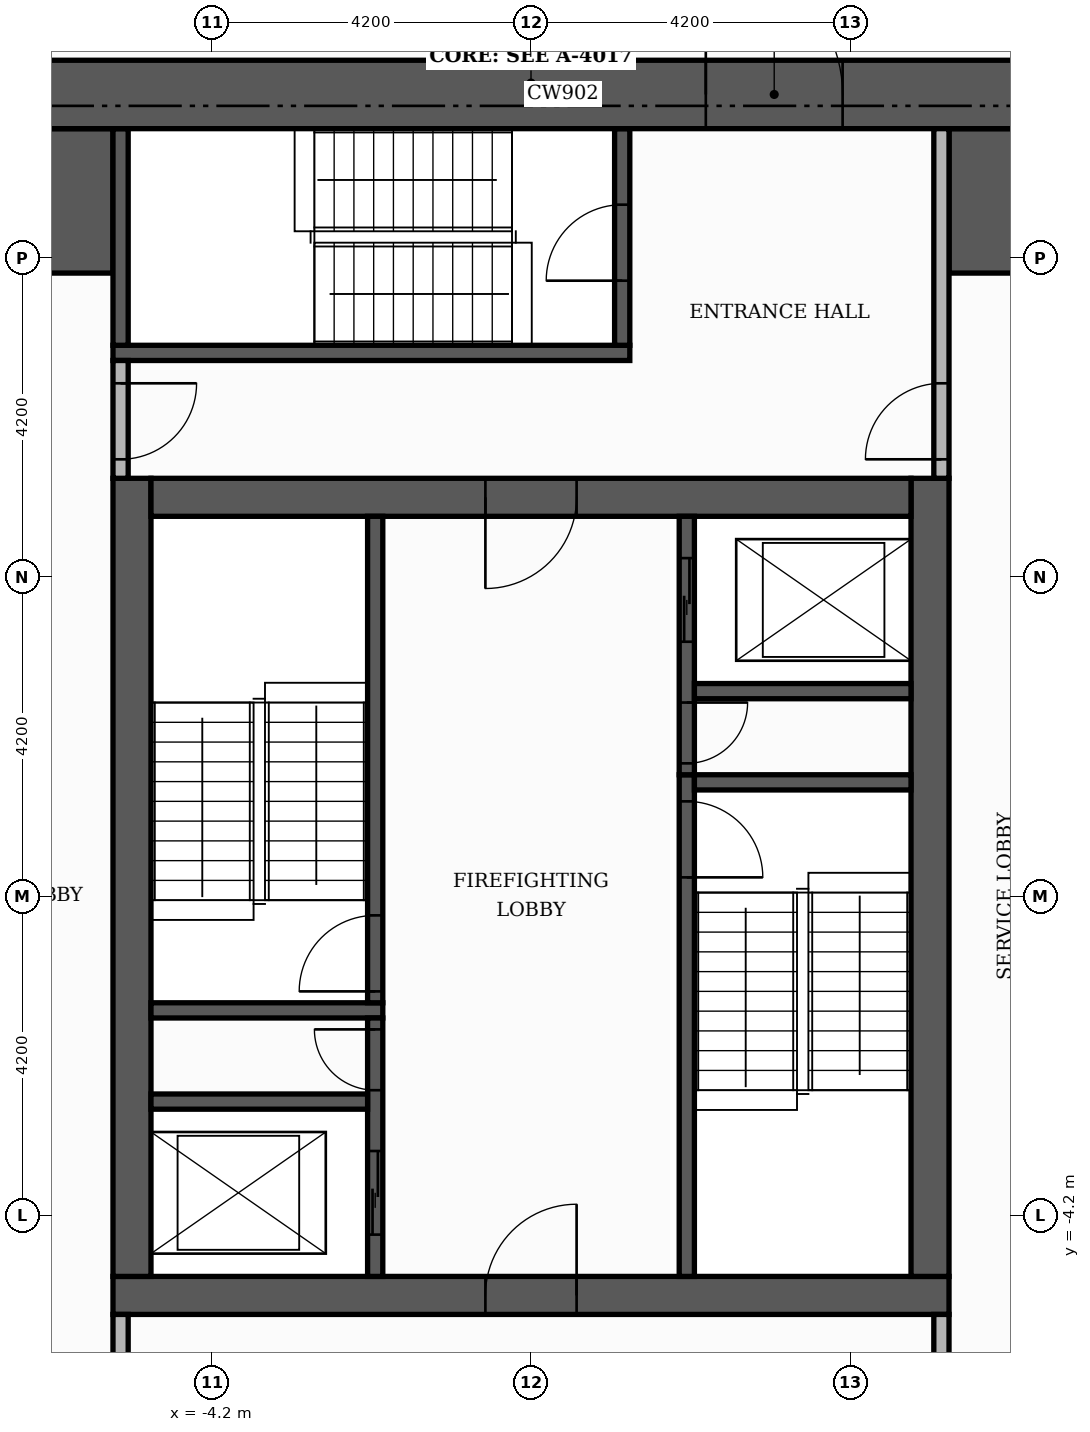
"""IFC4 building model, lengths in metres.
Left out: names, types, materials, properties, quantities, classifications, styles, units other than length and angle.
Written with IfcOpenShell. Run it as: python <this file> out.ifc"""

import sys

from ifc_helpers import new_model, si_unit, direction, frame, frame_2d, origin, place, context, subcontext, project, spatial, rectangle, extrude, element, fill, save


model = new_model("IFC4")
c1 = context("Model", 3, precision=1e-05, world=origin(), true_north=direction((0.0, 1.0)))
c2 = subcontext(c1, "Body", "Model", "MODEL_VIEW")
j1 = project(units=[si_unit("LENGTHUNIT", "METRE"), si_unit("PLANEANGLEUNIT", "RADIAN")], contexts=[c1])
p1 = place(None, origin())
s1 = spatial("IfcSite", under=j1, at=p1, CompositionType="ELEMENT")
p2 = place(p1, origin())
s2 = spatial("IfcBuilding", under=s1, at=p2, CompositionType="ELEMENT")
p3 = place(p2, frame((0.0, 0.0, 114.3)))
s3 = spatial("IfcBuildingStorey", under=s2, at=p3, CompositionType="ELEMENT", Elevation=114.3)
p4 = place(p3, frame((-5.5, -5.25, 0.0), z_axis=(0.0, 0.0, 1.0), x_axis=(1.0, 0.0, 0.0)))
e1 = element("IfcWall", 1, at=p4, inside=s3, PredefinedType="SHEAR", context=c2, shape_type="SweptSolid", body=[
    extrude(rectangle(XDim=11.0, YDim=0.5, at=frame_2d((5.5, 0.0))), origin(), (0.0, 0.0, 1.0), 3.48),
])
p5 = place(p4, frame((4.9, 0.0, 0.0)))
e2 = element("IfcOpeningElement", 2, at=p5, cuts=e1, PredefinedType="OPENING", context=c2, shape_type="SweptSolid", body=[
    extrude(rectangle(XDim=1.2, YDim=2.1, at=frame_2d((0.6, 1.05))), frame((0.0, 0.26, 0.0), z_axis=(0.0, -1.0, 0.0), x_axis=(1.0, 0.0, 0.0)), (0.0, 0.0, 1.0), 0.52),
])
for number, where, z_axis, x_axis in (
    (3, (-5.25, -5.0, 0.0), (0.0, 0.0, 1.0), (0.0, 1.0, 0.0)),
    (4, (5.25, -5.0, 0.0), (0.0, 0.0, 1.0), (0.0, 1.0, 0.0)),
):
    element("IfcWall", number, at=place(p3, frame(where, z_axis=z_axis, x_axis=x_axis)), inside=s3, PredefinedType="SHEAR", context=c2, shape_type="SweptSolid", body=[
        extrude(rectangle(XDim=10.5, YDim=0.5, at=frame_2d((5.25, 0.0))), origin(), (0.0, 0.0, 1.0), 3.48),
    ])
p6 = place(p3, frame((-5.0, 5.25, 0.0), z_axis=(0.0, 0.0, 1.0), x_axis=(1.0, 0.0, 0.0)))
e5 = element("IfcWall", 5, at=p6, inside=s3, PredefinedType="SHEAR", context=c2, shape_type="SweptSolid", body=[
    extrude(rectangle(XDim=10.0, YDim=0.5, at=frame_2d((5.0, 0.0))), origin(), (0.0, 0.0, 1.0), 3.48),
])
p7 = place(p6, frame((4.4, 0.0, 0.0)))
e6 = element("IfcOpeningElement", 6, at=p7, cuts=e5, PredefinedType="OPENING", context=c2, shape_type="SweptSolid", body=[
    extrude(rectangle(XDim=1.2, YDim=2.1, at=frame_2d((0.6, 1.05))), frame((0.0, 0.26, 0.0), z_axis=(0.0, -1.0, 0.0), x_axis=(1.0, 0.0, 0.0)), (0.0, 0.0, 1.0), 0.52),
])
for number, where, z_axis, x_axis in (
    (7, (-10.1, 9.15, 0.0), (0.0, 0.0, 1.0), (1.0, 0.0, 0.0)),
    (8, (5.5, 9.15, 0.0), (0.0, 0.0, 1.0), (1.0, 0.0, 0.0)),
):
    element("IfcWall", number, at=place(p3, frame(where, z_axis=z_axis, x_axis=x_axis)), inside=s3, PredefinedType="SHEAR", context=c2, shape_type="SweptSolid", body=[
        extrude(rectangle(XDim=4.6, YDim=1.9, at=frame_2d((2.3, 0.0))), origin(), (0.0, 0.0, 1.0), 3.48),
    ])
p8 = place(p3, frame((2.05, -5.0, 0.0), z_axis=(0.0, 0.0, 1.0), x_axis=(0.0, 1.0, 0.0)))
e9 = element("IfcWall", 9, at=p8, inside=s3, PredefinedType="SHEAR", context=c2, shape_type="SweptSolid", body=[
    extrude(rectangle(XDim=6.6, YDim=0.2, at=frame_2d((3.3, 0.0))), origin(), (0.0, 0.0, 1.0), 3.48),
])
p9 = place(p8, frame((5.25, 0.0, 0.0)))
e10 = element("IfcOpeningElement", 10, at=p9, cuts=e9, PredefinedType="OPENING", context=c2, shape_type="SweptSolid", body=[
    extrude(rectangle(XDim=1.0, YDim=2.1, at=frame_2d((0.5, 1.05))), frame((0.0, 0.11, 0.0), z_axis=(0.0, -1.0, 0.0), x_axis=(1.0, 0.0, 0.0)), (0.0, 0.0, 1.0), 0.22),
])
p10 = place(p3, frame((-5.0, -1.5, 0.0), z_axis=(0.0, 0.0, 1.0), x_axis=(1.0, 0.0, 0.0)))
e11 = element("IfcWall", 11, at=p10, inside=s3, PredefinedType="SHEAR", context=c2, shape_type="SweptSolid", body=[
    extrude(rectangle(XDim=3.05, YDim=0.2, at=frame_2d((1.525, 0.0))), origin(), (0.0, 0.0, 1.0), 3.48),
])
p11 = place(p3, frame((-2.05, -1.4, 0.0), z_axis=(0.0, 0.0, 1.0), x_axis=(0.0, 1.0, 0.0)))
e12 = element("IfcWall", 12, at=p11, inside=s3, PredefinedType="SHEAR", context=c2, shape_type="SweptSolid", body=[
    extrude(rectangle(XDim=6.4, YDim=0.2, at=frame_2d((3.2, 0.0))), origin(), (0.0, 0.0, 1.0), 3.48),
])
p12 = place(p11, frame((0.15, 0.0, 0.0)))
e13 = element("IfcOpeningElement", 13, at=p12, cuts=e12, PredefinedType="OPENING", context=c2, shape_type="SweptSolid", body=[
    extrude(rectangle(XDim=1.0, YDim=2.1, at=frame_2d((0.5, 1.05))), frame((0.0, 0.11, 0.0), z_axis=(0.0, -1.0, 0.0), x_axis=(1.0, 0.0, 0.0)), (0.0, 0.0, 1.0), 0.22),
])
p13 = place(p3, frame((2.15, 1.5, 0.0), z_axis=(0.0, 0.0, 1.0), x_axis=(1.0, 0.0, 0.0)))
e14 = element("IfcWall", 14, at=p13, inside=s3, PredefinedType="SHEAR", context=c2, shape_type="SweptSolid", body=[
    extrude(rectangle(XDim=2.85, YDim=0.2, at=frame_2d((1.425, 0.0))), origin(), (0.0, 0.0, 1.0), 3.48),
])
p14 = place(p3, frame((-5.5, 7.15, 0.0), z_axis=(0.0, 0.0, 1.0), x_axis=(1.0, 0.0, 0.0)))
e15 = element("IfcWall", 15, at=p14, inside=s3, PredefinedType="SHEAR", context=c2, shape_type="SweptSolid", body=[
    extrude(rectangle(XDim=6.8, YDim=0.2, at=frame_2d((3.4, 0.0))), origin(), (0.0, 0.0, 1.0), 3.48),
])
p15 = place(p3, frame((-5.4, 7.25, 0.0), z_axis=(0.0, 0.0, 1.0), x_axis=(0.0, 1.0, 0.0)))
e16 = element("IfcWall", 16, at=p15, inside=s3, PredefinedType="SHEAR", context=c2, shape_type="SweptSolid", body=[
    extrude(rectangle(XDim=2.85, YDim=0.2, at=frame_2d((1.425, 0.0))), origin(), (0.0, 0.0, 1.0), 3.48),
])
p16 = place(p3, frame((1.2, 7.25, 0.0), z_axis=(0.0, 0.0, 1.0), x_axis=(0.0, 1.0, 0.0)))
e17 = element("IfcWall", 17, at=p16, inside=s3, PredefinedType="SHEAR", context=c2, shape_type="SweptSolid", body=[
    extrude(rectangle(XDim=2.85, YDim=0.2, at=frame_2d((1.425, 0.0))), origin(), (0.0, 0.0, 1.0), 3.48),
])
p17 = place(p16, frame((0.85, 0.0, 0.0)))
e18 = element("IfcOpeningElement", 18, at=p17, cuts=e17, PredefinedType="OPENING", context=c2, shape_type="SweptSolid", body=[
    extrude(rectangle(XDim=1.0, YDim=2.1, at=frame_2d((0.5, 1.05))), frame((0.0, 0.11, 0.0), z_axis=(0.0, -1.0, 0.0), x_axis=(1.0, 0.0, 0.0)), (0.0, 0.0, 1.0), 0.22),
])
p18 = place(p3, frame((-2.05, -5.0, 0.0), z_axis=(0.0, 0.0, 1.0), x_axis=(0.0, 1.0, 0.0)))
e19 = element("IfcWall", 19, at=p18, inside=s3, PredefinedType="SHEAR", context=c2, shape_type="SweptSolid", body=[
    extrude(rectangle(XDim=3.4, YDim=0.2, at=frame_2d((1.7, 0.0))), origin(), (0.0, 0.0, 1.0), 3.48),
])
p19 = place(p18, frame((0.55, 0.0, 0.0)))
e20 = element("IfcOpeningElement", 20, at=p19, cuts=e19, PredefinedType="OPENING", context=c2, shape_type="SweptSolid", body=[
    extrude(rectangle(XDim=1.1, YDim=2.1, at=frame_2d((0.55, 1.05))), frame((0.0, 0.11, 0.0), z_axis=(0.0, -1.0, 0.0), x_axis=(1.0, 0.0, 0.0)), (0.0, 0.0, 1.0), 0.22),
])
p20 = place(p18, frame((2.45, 0.0, 0.0)))
e21 = element("IfcOpeningElement", 21, at=p20, cuts=e19, PredefinedType="OPENING", context=c2, shape_type="SweptSolid", body=[
    extrude(rectangle(XDim=0.8, YDim=2.1, at=frame_2d((0.4, 1.05))), frame((0.0, 0.11, 0.0), z_axis=(0.0, -1.0, 0.0), x_axis=(1.0, 0.0, 0.0)), (0.0, 0.0, 1.0), 0.22),
])
p21 = place(p3, frame((-5.0, -2.7, 0.0), z_axis=(0.0, 0.0, 1.0), x_axis=(1.0, 0.0, 0.0)))
e22 = element("IfcWall", 22, at=p21, inside=s3, PredefinedType="SHEAR", context=c2, shape_type="SweptSolid", body=[
    extrude(rectangle(XDim=2.85, YDim=0.2, at=frame_2d((1.425, 0.0))), origin(), (0.0, 0.0, 1.0), 3.48),
])
p22 = place(p3, frame((2.05, 1.6, 0.0), z_axis=(0.0, 0.0, 1.0), x_axis=(0.0, 1.0, 0.0)))
e23 = element("IfcWall", 23, at=p22, inside=s3, PredefinedType="SHEAR", context=c2, shape_type="SweptSolid", body=[
    extrude(rectangle(XDim=3.4, YDim=0.2, at=frame_2d((1.7, 0.0))), origin(), (0.0, 0.0, 1.0), 3.48),
])
p23 = place(p22, frame((1.75, 0.0, 0.0)))
e24 = element("IfcOpeningElement", 24, at=p23, cuts=e23, PredefinedType="OPENING", context=c2, shape_type="SweptSolid", body=[
    extrude(rectangle(XDim=1.1, YDim=2.1, at=frame_2d((0.55, 1.05))), frame((0.0, 0.11, 0.0), z_axis=(0.0, -1.0, 0.0), x_axis=(1.0, 0.0, 0.0)), (0.0, 0.0, 1.0), 0.22),
])
p24 = place(p22, frame((0.15, 0.0, 0.0)))
e25 = element("IfcOpeningElement", 25, at=p24, cuts=e23, PredefinedType="OPENING", context=c2, shape_type="SweptSolid", body=[
    extrude(rectangle(XDim=0.8, YDim=2.1, at=frame_2d((0.4, 1.05))), frame((0.0, 0.11, 0.0), z_axis=(0.0, -1.0, 0.0), x_axis=(1.0, 0.0, 0.0)), (0.0, 0.0, 1.0), 0.22),
])
p25 = place(p3, frame((2.15, 2.7, 0.0), z_axis=(0.0, 0.0, 1.0), x_axis=(1.0, 0.0, 0.0)))
e26 = element("IfcWall", 26, at=p25, inside=s3, PredefinedType="SHEAR", context=c2, shape_type="SweptSolid", body=[
    extrude(rectangle(XDim=2.85, YDim=0.2, at=frame_2d((1.425, 0.0))), origin(), (0.0, 0.0, 1.0), 3.48),
])
p26 = place(p3, frame((-11.0, 10.55, 0.0), z_axis=(0.0, 0.0, 1.0), x_axis=(1.0, 0.0, 0.0)))
e27 = element("IfcWall", 27, at=p26, inside=s3, PredefinedType="SHEAR", context=c2, shape_type="SweptSolid", body=[
    extrude(rectangle(XDim=22.0, YDim=0.9, at=frame_2d((11.0, 0.0))), origin(), (0.0, 0.0, 1.0), 3.48),
])
p27 = place(p26, frame((13.3, 0.0, 0.0)))
e28 = element("IfcOpeningElement", 28, at=p27, cuts=e27, PredefinedType="OPENING", context=c2, shape_type="SweptSolid", body=[
    extrude(rectangle(XDim=1.8, YDim=2.2, at=frame_2d((0.9, 1.1))), frame((0.0, 0.46, 0.0), z_axis=(0.0, -1.0, 0.0), x_axis=(1.0, 0.0, 0.0)), (0.0, 0.0, 1.0), 0.92),
])
p28 = place(p3, frame((-5.4, -10.1, 0.0), z_axis=(0.0, 0.0, 1.0), x_axis=(0.0, 1.0, 0.0)))
e29 = element("IfcWall", 29, at=p28, inside=s3, PredefinedType="PARTITIONING", context=c2, shape_type="SweptSolid", body=[
    extrude(rectangle(XDim=4.6, YDim=0.2, at=frame_2d((2.3, 0.0))), origin(), (0.0, 0.0, 1.0), 3.48),
])
p29 = place(p28, frame((2.9, 0.0, 0.0)))
e30 = element("IfcOpeningElement", 30, at=p29, cuts=e29, PredefinedType="OPENING", context=c2, shape_type="SweptSolid", body=[
    extrude(rectangle(XDim=1.0, YDim=2.1, at=frame_2d((0.5, 1.05))), frame((0.0, 0.11, 0.0), z_axis=(0.0, -1.0, 0.0), x_axis=(1.0, 0.0, 0.0)), (0.0, 0.0, 1.0), 0.22),
])
p30 = place(p3, frame((5.4, -7.9, 0.0), z_axis=(0.0, 0.0, 1.0), x_axis=(0.0, 1.0, 0.0)))
e31 = element("IfcWall", 31, at=p30, inside=s3, PredefinedType="PARTITIONING", context=c2, shape_type="SweptSolid", body=[
    extrude(rectangle(XDim=2.4, YDim=0.2, at=frame_2d((1.2, 0.0))), origin(), (0.0, 0.0, 1.0), 3.48),
])
p31 = place(p30, frame((0.7, 0.0, 0.0)))
e32 = element("IfcOpeningElement", 32, at=p31, cuts=e31, PredefinedType="OPENING", context=c2, shape_type="SweptSolid", body=[
    extrude(rectangle(XDim=1.0, YDim=2.1, at=frame_2d((0.5, 1.05))), frame((0.0, 0.11, 0.0), z_axis=(0.0, -1.0, 0.0), x_axis=(1.0, 0.0, 0.0)), (0.0, 0.0, 1.0), 0.22),
])
p32 = place(p3, frame((-5.4, 5.5, 0.0), z_axis=(0.0, 0.0, 1.0), x_axis=(0.0, 1.0, 0.0)))
e33 = element("IfcWall", 33, at=p32, inside=s3, PredefinedType="PARTITIONING", context=c2, shape_type="SweptSolid", body=[
    extrude(rectangle(XDim=1.55, YDim=0.2, at=frame_2d((0.775, 0.0))), origin(), (0.0, 0.0, 1.0), 3.48),
])
p33 = place(p32, frame((0.25, 0.0, 0.0)))
e34 = element("IfcOpeningElement", 34, at=p33, cuts=e33, PredefinedType="OPENING", context=c2, shape_type="SweptSolid", body=[
    extrude(rectangle(XDim=1.0, YDim=2.1, at=frame_2d((0.5, 1.05))), frame((0.0, 0.11, 0.0), z_axis=(0.0, -1.0, 0.0), x_axis=(1.0, 0.0, 0.0)), (0.0, 0.0, 1.0), 0.22),
])
p34 = place(p3, frame((5.4, 5.5, 0.0), z_axis=(0.0, 0.0, 1.0), x_axis=(0.0, 1.0, 0.0)))
e35 = element("IfcWall", 35, at=p34, inside=s3, PredefinedType="PARTITIONING", context=c2, shape_type="SweptSolid", body=[
    extrude(rectangle(XDim=4.6, YDim=0.2, at=frame_2d((2.3, 0.0))), origin(), (0.0, 0.0, 1.0), 3.48),
])
p35 = place(p34, frame((0.25, 0.0, 0.0)))
e36 = element("IfcOpeningElement", 36, at=p35, cuts=e35, PredefinedType="OPENING", context=c2, shape_type="SweptSolid", body=[
    extrude(rectangle(XDim=1.0, YDim=2.1, at=frame_2d((0.5, 1.05))), frame((0.0, 0.11, 0.0), z_axis=(0.0, -1.0, 0.0), x_axis=(1.0, 0.0, 0.0)), (0.0, 0.0, 1.0), 0.22),
])
p36 = place(p23, origin())
e37 = element("IfcDoor", 37, at=p36, inside=s3, OperationType="SLIDING_TO_LEFT", PredefinedType="DOOR", context=c2, shape_type="SweptSolid", body=[
    extrude(rectangle(XDim=1.1, YDim=2.1, at=frame_2d((0.55, 1.05))), frame((0.0, 0.025, 0.0), z_axis=(0.0, -1.0, 0.0), x_axis=(1.0, 0.0, 0.0)), (0.0, 0.0, 1.0), 0.05),
])
fill(e24, e37)
p37 = place(p19, origin())
e38 = element("IfcDoor", 38, at=p37, inside=s3, OperationType="SLIDING_TO_LEFT", PredefinedType="DOOR", context=c2, shape_type="SweptSolid", body=[
    extrude(rectangle(XDim=1.1, YDim=2.1, at=frame_2d((0.55, 1.05))), frame((0.0, 0.025, 0.0), z_axis=(0.0, -1.0, 0.0), x_axis=(1.0, 0.0, 0.0)), (0.0, 0.0, 1.0), 0.05),
])
fill(e20, e38)
p38 = place(p12, origin())
e39 = element("IfcDoor", 39, at=p38, inside=s3, OperationType="SINGLE_SWING_LEFT", PredefinedType="DOOR", context=c2, shape_type="SweptSolid", body=[
    extrude(rectangle(XDim=1.0, YDim=2.1, at=frame_2d((0.5, 1.05))), frame((0.0, 0.025, 0.0), z_axis=(0.0, -1.0, 0.0), x_axis=(1.0, 0.0, 0.0)), (0.0, 0.0, 1.0), 0.05),
])
fill(e13, e39)
p39 = place(p9, frame((1.0, 0.0, 0.0), z_axis=(0.0, 0.0, 1.0), x_axis=(-1.0, 0.0, 0.0)))
e40 = element("IfcDoor", 40, at=p39, inside=s3, OperationType="SINGLE_SWING_LEFT", PredefinedType="DOOR", context=c2, shape_type="SweptSolid", body=[
    extrude(rectangle(XDim=1.0, YDim=2.1, at=frame_2d((0.5, 1.05))), frame((0.0, 0.025, 0.0), z_axis=(0.0, -1.0, 0.0), x_axis=(1.0, 0.0, 0.0)), (0.0, 0.0, 1.0), 0.05),
])
fill(e10, e40)
p40 = place(p24, frame((0.8, 0.0, 0.0), z_axis=(0.0, 0.0, 1.0), x_axis=(-1.0, 0.0, 0.0)))
e41 = element("IfcDoor", 41, at=p40, inside=s3, OperationType="SINGLE_SWING_RIGHT", PredefinedType="DOOR", context=c2, shape_type="SweptSolid", body=[
    extrude(rectangle(XDim=0.8, YDim=2.1, at=frame_2d((0.4, 1.05))), frame((0.0, 0.025, 0.0), z_axis=(0.0, -1.0, 0.0), x_axis=(1.0, 0.0, 0.0)), (0.0, 0.0, 1.0), 0.05),
])
fill(e25, e41)
p41 = place(p20, origin())
e42 = element("IfcDoor", 42, at=p41, inside=s3, OperationType="SINGLE_SWING_RIGHT", PredefinedType="DOOR", context=c2, shape_type="SweptSolid", body=[
    extrude(rectangle(XDim=0.8, YDim=2.1, at=frame_2d((0.4, 1.05))), frame((0.0, 0.025, 0.0), z_axis=(0.0, -1.0, 0.0), x_axis=(1.0, 0.0, 0.0)), (0.0, 0.0, 1.0), 0.05),
])
fill(e21, e42)
p42 = place(p7, frame((1.2, 0.0, 0.0), z_axis=(0.0, 0.0, 1.0), x_axis=(-1.0, 0.0, 0.0)))
e43 = element("IfcDoor", 43, at=p42, inside=s3, OperationType="SINGLE_SWING_LEFT", PredefinedType="DOOR", context=c2, shape_type="SweptSolid", body=[
    extrude(rectangle(XDim=1.2, YDim=2.1, at=frame_2d((0.6, 1.05))), frame((0.0, 0.025, 0.0), z_axis=(0.0, -1.0, 0.0), x_axis=(1.0, 0.0, 0.0)), (0.0, 0.0, 1.0), 0.05),
])
fill(e6, e43)
p43 = place(p5, origin())
e44 = element("IfcDoor", 44, at=p43, inside=s3, OperationType="SINGLE_SWING_RIGHT", PredefinedType="DOOR", context=c2, shape_type="SweptSolid", body=[
    extrude(rectangle(XDim=1.2, YDim=2.1, at=frame_2d((0.6, 1.05))), frame((0.0, 0.025, 0.0), z_axis=(0.0, -1.0, 0.0), x_axis=(1.0, 0.0, 0.0)), (0.0, 0.0, 1.0), 0.05),
])
fill(e2, e44)
p44 = place(p17, origin())
e45 = element("IfcDoor", 45, at=p44, inside=s3, OperationType="SINGLE_SWING_LEFT", PredefinedType="DOOR", context=c2, shape_type="SweptSolid", body=[
    extrude(rectangle(XDim=1.0, YDim=2.1, at=frame_2d((0.5, 1.05))), frame((0.0, 0.025, 0.0), z_axis=(0.0, -1.0, 0.0), x_axis=(1.0, 0.0, 0.0)), (0.0, 0.0, 1.0), 0.05),
])
fill(e18, e45)
p45 = place(p33, frame((1.0, 0.0, 0.0), z_axis=(0.0, 0.0, 1.0), x_axis=(-1.0, 0.0, 0.0)))
e46 = element("IfcDoor", 46, at=p45, inside=s3, OperationType="SINGLE_SWING_RIGHT", PredefinedType="DOOR", context=c2, shape_type="SweptSolid", body=[
    extrude(rectangle(XDim=1.0, YDim=2.1, at=frame_2d((0.5, 1.05))), frame((0.0, 0.025, 0.0), z_axis=(0.0, -1.0, 0.0), x_axis=(1.0, 0.0, 0.0)), (0.0, 0.0, 1.0), 0.05),
])
fill(e34, e46)
p46 = place(p35, origin())
e47 = element("IfcDoor", 47, at=p46, inside=s3, OperationType="SINGLE_SWING_LEFT", PredefinedType="DOOR", context=c2, shape_type="SweptSolid", body=[
    extrude(rectangle(XDim=1.0, YDim=2.1, at=frame_2d((0.5, 1.05))), frame((0.0, 0.025, 0.0), z_axis=(0.0, -1.0, 0.0), x_axis=(1.0, 0.0, 0.0)), (0.0, 0.0, 1.0), 0.05),
])
fill(e36, e47)
p47 = place(p27, origin())
e48 = element("IfcDoor", 48, at=p47, inside=s3, OperationType="DOUBLE_DOOR_SINGLE_SWING", PredefinedType="DOOR", context=c2, shape_type="SweptSolid", body=[
    extrude(rectangle(XDim=1.8, YDim=2.2, at=frame_2d((0.9, 1.1))), frame((0.0, 0.025, 0.0), z_axis=(0.0, -1.0, 0.0), x_axis=(1.0, 0.0, 0.0)), (0.0, 0.0, 1.0), 0.05),
])
fill(e28, e48)
save(model, sys.argv[1])
